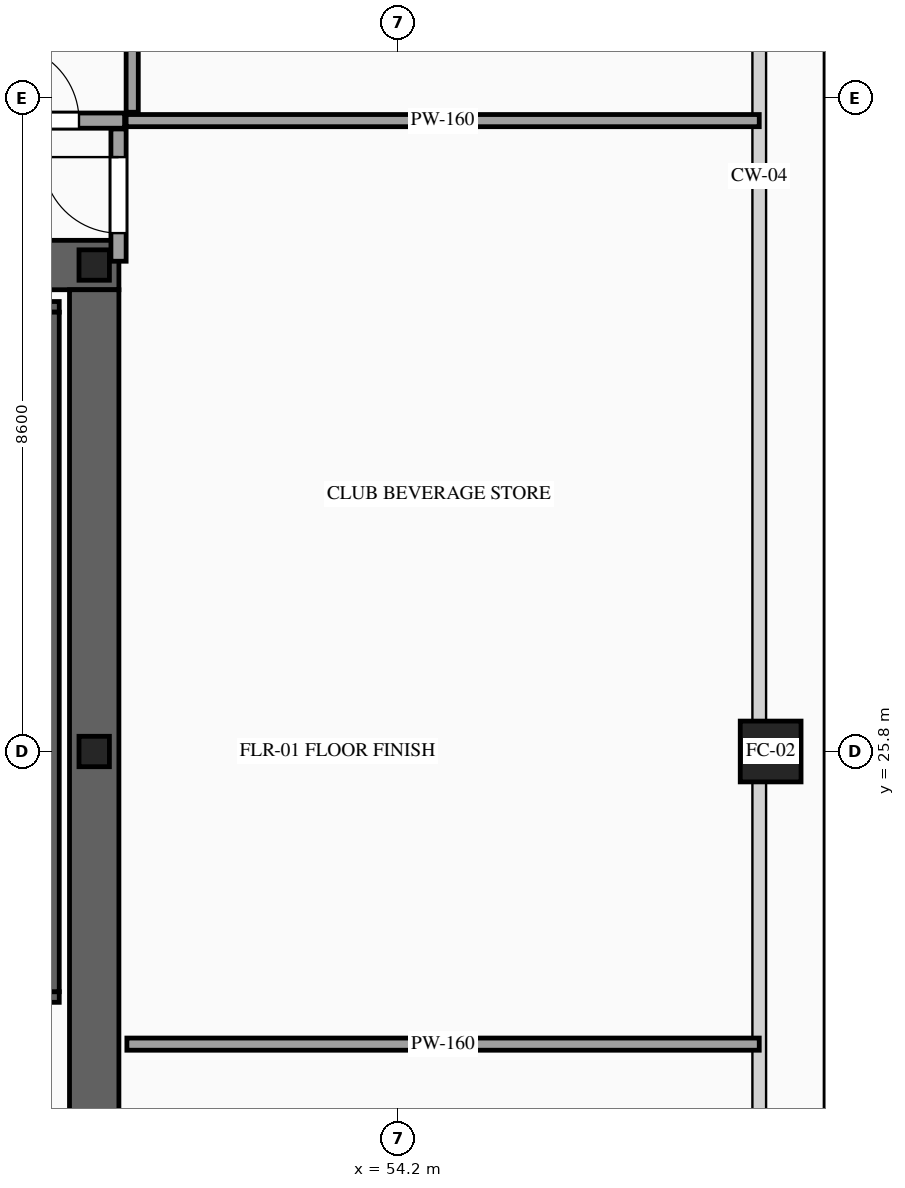
"""IFC4 building model, lengths in metres.
Left out: names, types, materials, properties, quantities, classifications, styles, units other than length and angle.
Written with IfcOpenShell. Run it as: python <this file> out.ifc"""

import sys

from ifc_helpers import new_model, si_unit, direction, frame, frame_2d, origin, origin_2d, place, context, subcontext, project, spatial, rectangle, hollow_rectangle, i_section, extrude, source, transform, mapped, element, fill, save


model = new_model("IFC4")
c1 = context("Model", 3, precision=1e-05, world=origin(), true_north=direction((0.0, 1.0)))
c2 = subcontext(c1, "Body", "Model", "MODEL_VIEW")
j1 = project(units=[si_unit("LENGTHUNIT", "METRE"), si_unit("PLANEANGLEUNIT", "RADIAN")], contexts=[c1])
p1 = place(None, origin())
s1 = spatial("IfcSite", under=j1, at=p1, CompositionType="ELEMENT")
p2 = place(p1, origin())
s2 = spatial("IfcBuilding", under=s1, at=p2, CompositionType="ELEMENT")
p3 = place(p2, frame((0.0, 0.0, 171.6)))
s3 = spatial("IfcBuildingStorey", under=s2, at=p3, CompositionType="ELEMENT", Elevation=171.6)
p4 = place(p3, frame((23.475, 32.2, 0.0), z_axis=(0.0, 0.0, 1.0), x_axis=(1.0, 0.0, 0.0)))
e1 = element("IfcWall", 1, at=p4, inside=s3, PredefinedType="SHEAR", context=c2, shape_type="SweptSolid", body=[
    extrude(rectangle(XDim=27.05, YDim=0.65, at=frame_2d((13.525, 0.0))), origin(), (0.0, 0.0, 1.0), 4.8),
])
p5 = place(p4, frame((4.595, 0.0, 0.0)))
e2 = element("IfcOpeningElement", 2, at=p5, cuts=e1, PredefinedType="OPENING", context=c2, shape_type="SweptSolid", body=[
    extrude(rectangle(XDim=0.9, YDim=2.15, at=frame_2d((0.45, 1.075))), frame((0.0, 0.34, 0.0), z_axis=(0.0, -1.0, 0.0), x_axis=(1.0, 0.0, 0.0)), (0.0, 0.0, 1.0), 0.68),
])
p6 = place(p4, frame((9.875, 0.0, 0.0)))
e3 = element("IfcOpeningElement", 3, at=p6, cuts=e1, PredefinedType="OPENING", context=c2, shape_type="SweptSolid", body=[
    extrude(rectangle(XDim=1.1, YDim=2.2, at=frame_2d((0.55, 1.1))), frame((0.0, 0.34, 0.0), z_axis=(0.0, -1.0, 0.0), x_axis=(1.0, 0.0, 0.0)), (0.0, 0.0, 1.0), 0.68),
])
p7 = place(p4, frame((15.725, 0.0, 0.0)))
e4 = element("IfcOpeningElement", 4, at=p7, cuts=e1, PredefinedType="OPENING", context=c2, shape_type="SweptSolid", body=[
    extrude(rectangle(XDim=1.1, YDim=2.2, at=frame_2d((0.55, 1.1))), frame((0.0, 0.34, 0.0), z_axis=(0.0, -1.0, 0.0), x_axis=(1.0, 0.0, 0.0)), (0.0, 0.0, 1.0), 0.68),
])
m1 = source(origin(), c2, "Body", "SweptSolid", [
    extrude(rectangle(XDim=12.15, YDim=0.65, at=frame_2d((6.075, 0.0))), origin(), (0.0, 0.0, 1.0), 4.8),
])
p8 = place(p3, frame((50.2, 19.725, 0.0), z_axis=(0.0, 0.0, 1.0), x_axis=(0.0, 1.0, 0.0)))
e5 = element("IfcWall", 5, at=p8, inside=s3, PredefinedType="SHEAR", context=c2, shape_type="MappedRepresentation", body=[
    mapped(m1, transform((0.0, 0.0, 0.0), scale=1.0)),
])
m2 = source(origin(), c2, "Body", "SweptSolid", [
    extrude(i_section(OverallWidth=0.4, OverallDepth=0.4, WebThickness=0.013, FlangeThickness=0.021, at=origin_2d()), origin(), (0.0, 0.0, 1.0), 4.8),
])
for number, where, z_axis, x_axis in (
    (6, (50.2, 25.8, 0.0), (0.0, 0.0, 1.0), (1.0, 0.0, 0.0)),
    (7, (50.2, 32.2, 0.0), (0.0, 0.0, 1.0), (1.0, 0.0, 0.0)),
):
    element("IfcColumn", number, at=place(p3, frame(where, z_axis=z_axis, x_axis=x_axis)), inside=s3, PredefinedType="COLUMN", context=c2, shape_type="MappedRepresentation", body=[
        mapped(m2, transform((0.0, 0.0, 0.0), scale=1.0)),
    ])
m3 = source(origin(), c2, "Body", "SweptSolid", [
    extrude(hollow_rectangle(XDim=0.8, YDim=0.8, WallThickness=0.036, at=origin_2d()), origin(), (0.0, 0.0, 1.0), 4.8),
])
p9 = place(p3, frame((59.1, 25.8, 0.0), z_axis=(0.0, 0.0, 1.0), x_axis=(1.0, 0.0, 0.0)))
e8 = element("IfcColumn", 8, at=p9, inside=s3, PredefinedType="COLUMN", context=c2, shape_type="MappedRepresentation", body=[
    mapped(m3, transform((0.0, 0.0, 0.0), scale=1.0)),
])
p10 = place(p3, frame((46.46, 22.57, 0.0), z_axis=(0.0, 0.0, 1.0), x_axis=(1.0, 0.0, 0.0)))
e9 = element("IfcWall", 9, at=p10, inside=s3, PredefinedType="SOLIDWALL", context=c2, shape_type="SweptSolid", body=[
    extrude(rectangle(XDim=3.28, YDim=0.14, at=frame_2d((1.64, 0.0))), origin(), (0.0, 0.0, 1.0), 4.52),
])
p11 = place(p10, frame((1.09, 0.0, 0.0)))
e10 = element("IfcOpeningElement", 10, at=p11, cuts=e9, PredefinedType="OPENING", context=c2, shape_type="SweptSolid", body=[
    extrude(rectangle(XDim=1.1, YDim=2.2, at=frame_2d((0.55, 1.1))), frame((0.0, 0.085, 0.0), z_axis=(0.0, -1.0, 0.0), x_axis=(1.0, 0.0, 0.0)), (0.0, 0.0, 1.0), 0.17),
])
m4 = source(origin(), c2, "Body", "SweptSolid", [
    extrude(rectangle(XDim=3.28, YDim=0.14, at=frame_2d((1.64, 0.0))), origin(), (0.0, 0.0, 1.0), 4.52),
])
p12 = place(p3, frame((46.46, 31.65, 0.0), z_axis=(0.0, 0.0, 1.0), x_axis=(1.0, 0.0, 0.0)))
e11 = element("IfcWall", 11, at=p12, inside=s3, PredefinedType="SOLIDWALL", context=c2, shape_type="MappedRepresentation", body=[
    mapped(m4, transform((0.0, 0.0, 0.0), scale=1.0)),
])
m5 = source(origin(), c2, "Body", "SweptSolid", [
    extrude(rectangle(XDim=8.94, YDim=0.14, at=frame_2d((4.47, 0.0))), origin(), (0.0, 0.0, 1.0), 4.52),
])
p13 = place(p3, frame((49.67, 22.64, 0.0), z_axis=(0.0, 0.0, 1.0), x_axis=(0.0, 1.0, 0.0)))
e12 = element("IfcWall", 12, at=p13, inside=s3, PredefinedType="SOLIDWALL", context=c2, shape_type="MappedRepresentation", body=[
    mapped(m5, transform((0.0, 0.0, 0.0), scale=1.0)),
])
m6 = source(origin(), c2, "Body", "SweptSolid", [
    extrude(rectangle(XDim=8.32, YDim=0.16, at=frame_2d((4.16, 0.0))), origin(), (0.0, 0.0, 1.0), 4.52),
])
p14 = place(p3, frame((50.63, 21.95, 0.0), z_axis=(0.0, 0.0, 1.0), x_axis=(1.0, 0.0, 0.0)))
e13 = element("IfcWall", 13, at=p14, inside=s3, PredefinedType="PARTITIONING", context=c2, shape_type="MappedRepresentation", body=[
    mapped(m6, transform((0.0, 0.0, 0.0), scale=1.0)),
])
p15 = place(p3, frame((50.52, 32.25, 0.0), z_axis=(0.0, 0.0, 1.0), x_axis=(0.0, 1.0, 0.0)))
e14 = element("IfcWall", 14, at=p15, inside=s3, PredefinedType="PARTITIONING", context=c2, shape_type="SweptSolid", body=[
    extrude(rectangle(XDim=1.74, YDim=0.2, at=frame_2d((0.87, 0.0))), origin(), (0.0, 0.0, 1.0), 4.52),
])
p16 = place(p15, frame((0.37, 0.0, 0.0)))
e15 = element("IfcOpeningElement", 15, at=p16, cuts=e14, PredefinedType="OPENING", context=c2, shape_type="SweptSolid", body=[
    extrude(rectangle(XDim=1.0, YDim=2.2, at=frame_2d((0.5, 1.1))), frame((0.0, 0.115, 0.0), z_axis=(0.0, -1.0, 0.0), x_axis=(1.0, 0.0, 0.0)), (0.0, 0.0, 1.0), 0.23),
])
m7 = source(origin(), c2, "Body", "SweptSolid", [
    extrude(rectangle(XDim=8.33, YDim=0.16, at=frame_2d((4.165, 0.0))), origin(), (0.0, 0.0, 1.0), 4.52),
])
p17 = place(p3, frame((50.62, 34.1, 0.0), z_axis=(0.0, 0.0, 1.0), x_axis=(1.0, 0.0, 0.0)))
e16 = element("IfcWall", 16, at=p17, inside=s3, PredefinedType="PARTITIONING", context=c2, shape_type="MappedRepresentation", body=[
    mapped(m7, transform((0.0, 0.0, 0.0), scale=1.0)),
])
p18 = place(p3, frame((48.4, 34.1, 0.0), z_axis=(0.0, 0.0, 1.0), x_axis=(1.0, 0.0, 0.0)))
e17 = element("IfcWall", 17, at=p18, inside=s3, PredefinedType="PARTITIONING", context=c2, shape_type="SweptSolid", body=[
    extrude(rectangle(XDim=2.2, YDim=0.2, at=frame_2d((1.1, 0.0))), origin(), (0.0, 0.0, 1.0), 4.52),
])
p19 = place(p18, frame((0.6, 0.0, 0.0)))
e18 = element("IfcOpeningElement", 18, at=p19, cuts=e17, PredefinedType="OPENING", context=c2, shape_type="SweptSolid", body=[
    extrude(rectangle(XDim=1.0, YDim=2.2, at=frame_2d((0.5, 1.1))), frame((0.0, 0.115, 0.0), z_axis=(0.0, -1.0, 0.0), x_axis=(1.0, 0.0, 0.0)), (0.0, 0.0, 1.0), 0.23),
])
m8 = source(origin(), c2, "Body", "SweptSolid", [
    extrude(rectangle(XDim=13.54, YDim=0.16, at=frame_2d((6.77, 0.0))), origin(), (0.0, 0.0, 1.0), 4.52),
])
p20 = place(p3, frame((50.7, 34.21, 0.0), z_axis=(0.0, 0.0, 1.0), x_axis=(0.0, 1.0, 0.0)))
e19 = element("IfcWall", 19, at=p20, inside=s3, PredefinedType="PARTITIONING", context=c2, shape_type="MappedRepresentation", body=[
    mapped(m8, transform((0.0, 0.0, 0.0), scale=1.0)),
])
m9 = source(origin(), c2, "Body", "SweptSolid", [
    extrude(rectangle(XDim=1.0, YDim=2.2, at=frame_2d((0.5, 1.1))), frame((0.0, 0.025, 0.0), z_axis=(0.0, -1.0, 0.0), x_axis=(1.0, 0.0, 0.0)), (0.0, 0.0, 1.0), 0.05),
])
p21 = place(p16, origin())
e20 = element("IfcDoor", 20, at=p21, inside=s3, OperationType="SINGLE_SWING_RIGHT", PredefinedType="DOOR", context=c2, shape_type="MappedRepresentation", body=[
    mapped(m9, transform((0.0, 0.0, 0.0), scale=1.0)),
])
fill(e15, e20)
p22 = place(p19, origin())
e21 = element("IfcDoor", 21, at=p22, inside=s3, OperationType="SINGLE_SWING_LEFT", PredefinedType="DOOR", context=c2, shape_type="MappedRepresentation", body=[
    mapped(m9, transform((0.0, 0.0, 0.0), scale=1.0)),
])
fill(e18, e21)
save(model, sys.argv[1])
